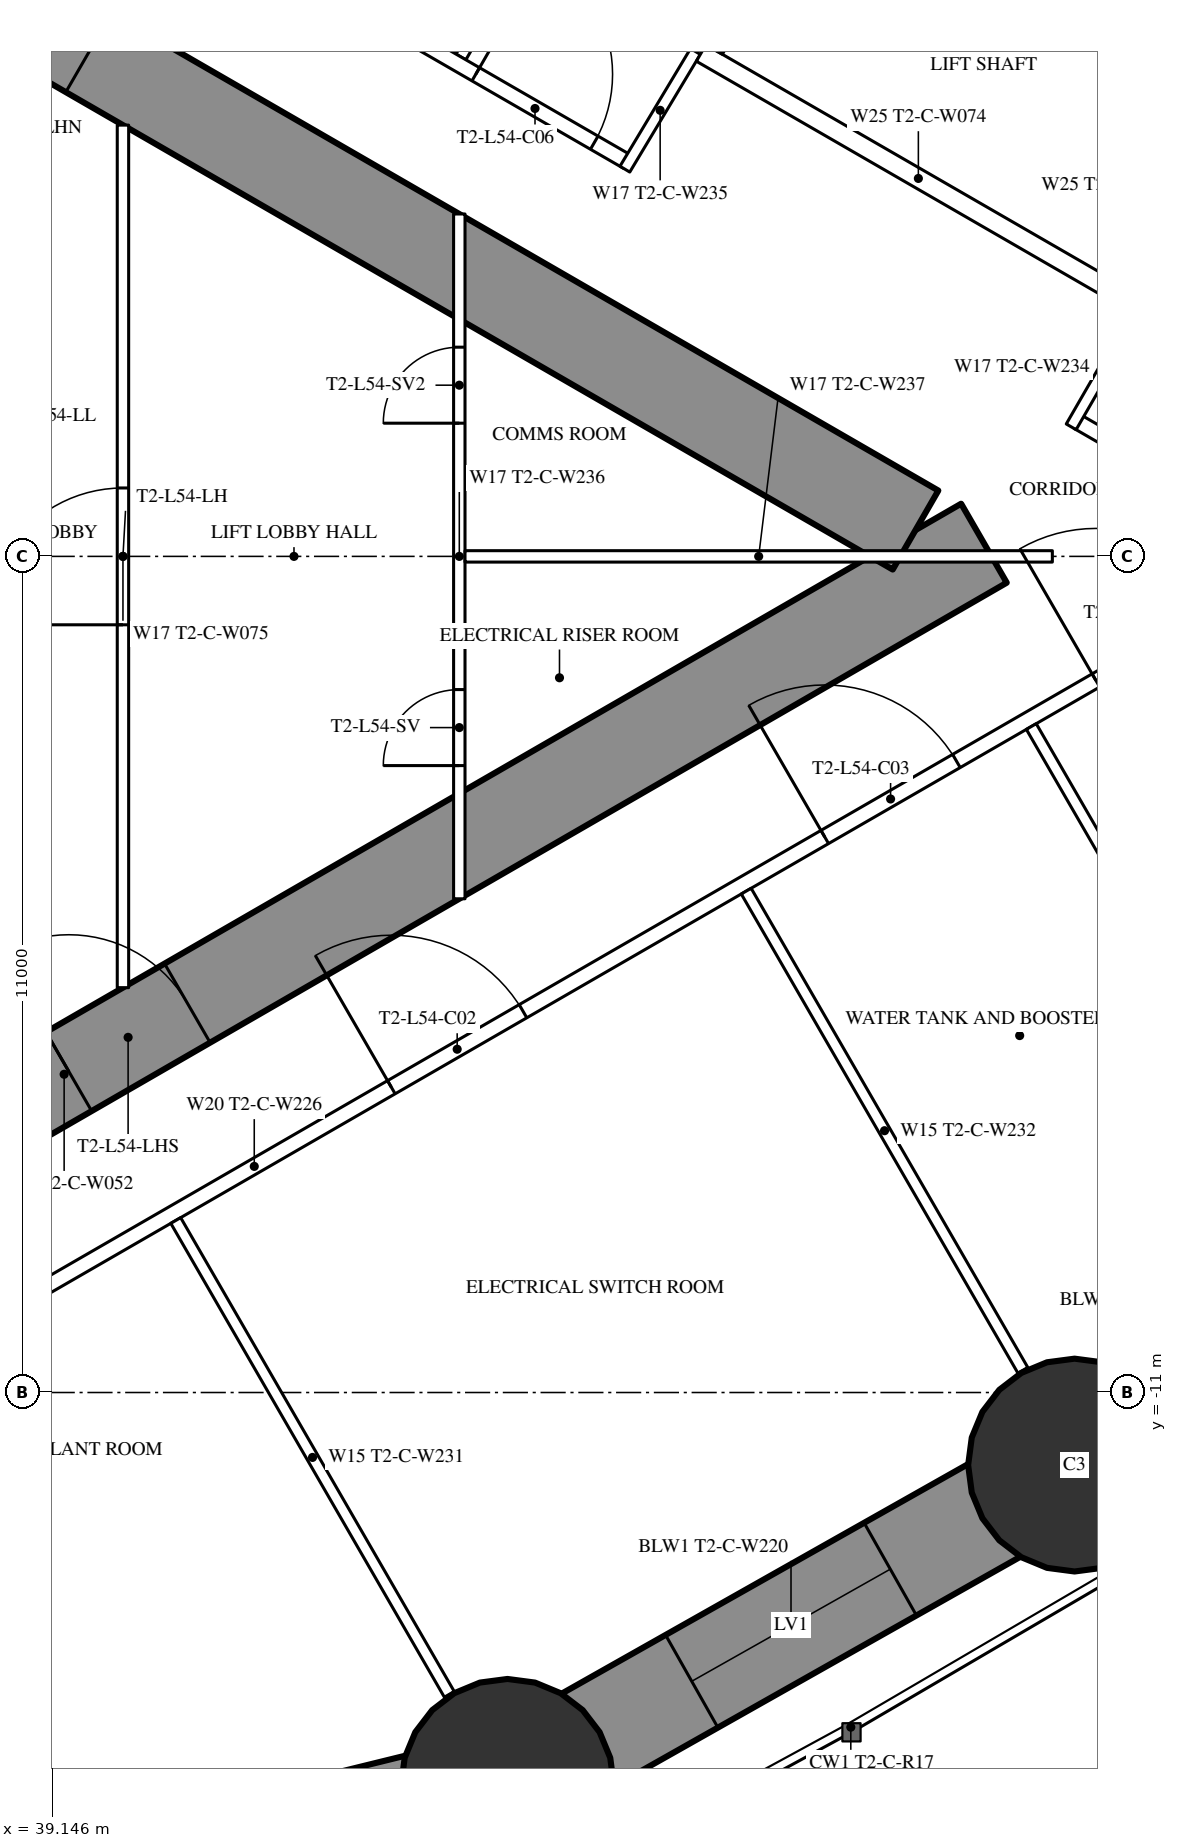
"""IFC4 building model, lengths in metres.
Left out: names, types, materials, properties, quantities, classifications, styles, units other than length and angle.
Written with IfcOpenShell. Run it as: python <this file> out.ifc"""

import sys

from ifc_helpers import new_model, si_unit, direction, frame, frame_2d, origin, origin_2d, place, context, subcontext, project, spatial, rectangle, circle, extrude, element, fill, save


model = new_model("IFC4")
c1 = context("Model", 3, precision=1e-05, world=origin(), true_north=direction((0.0, 1.0)))
c2 = subcontext(c1, "Body", "Model", "MODEL_VIEW")
j1 = project(units=[si_unit("LENGTHUNIT", "METRE"), si_unit("PLANEANGLEUNIT", "RADIAN")], contexts=[c1])
p1 = place(None, origin())
s1 = spatial("IfcSite", under=j1, at=p1, CompositionType="ELEMENT")
p2 = place(p1, origin())
s2 = spatial("IfcBuilding", under=s1, at=p2, CompositionType="ELEMENT")
p3 = place(p2, frame((0.0, 0.0, 201.8)))
s3 = spatial("IfcBuildingStorey", under=s2, at=p3, CompositionType="ELEMENT", Elevation=201.8)
for number, where, z_axis, x_axis in (
    (1, (45.134, -16.168, 0.0), (0.0, 0.0, 1.0), (1.0, 0.0, 0.0)),
    (2, (52.594, -11.955, 0.0), (0.0, 0.0, 1.0), (1.0, 0.0, 0.0)),
):
    element("IfcColumn", number, at=place(p3, frame(where, z_axis=z_axis, x_axis=x_axis)), inside=s3, PredefinedType="COLUMN", context=c2, shape_type="SweptSolid", body=[
        extrude(circle(Radius=1.4, at=origin_2d()), origin(), (0.0, 0.0, 1.0), 3.5),
    ])
p4 = place(p3, frame((27.2, -13.8, 0.0), z_axis=(0.0, 0.0, 1.0), x_axis=(0.866027159892, 0.499996958321, 0.0)))
e3 = element("IfcWall", 3, at=p4, inside=s3, PredefinedType="SHEAR", context=c2, shape_type="SweptSolid", body=[
    extrude(rectangle(XDim=27.947, YDim=1.2, at=frame_2d((13.973, 0.0))), origin(), (0.0, 0.0, 1.0), 3.5),
])
p5 = place(p4, frame((6.5, 0.0, 0.0)))
e4 = element("IfcOpeningElement", 4, at=p5, cuts=e3, PredefinedType="OPENING", context=c2, shape_type="SweptSolid", body=[
    extrude(rectangle(XDim=1.0, YDim=2.2, at=frame_2d((0.5, 1.1))), frame((0.0, 0.61, 0.0), z_axis=(0.0, -1.0, 0.0), x_axis=(1.0, 0.0, 0.0)), (0.0, 0.0, 1.0), 1.22),
])
p6 = place(p4, frame((14.045, 0.0, 0.0)))
e5 = element("IfcOpeningElement", 5, at=p6, cuts=e3, PredefinedType="OPENING", context=c2, shape_type="SweptSolid", body=[
    extrude(rectangle(XDim=1.8, YDim=2.2, at=frame_2d((0.9, 1.1))), frame((0.0, 0.61, 0.0), z_axis=(0.0, -1.0, 0.0), x_axis=(1.0, 0.0, 0.0)), (0.0, 0.0, 1.0), 1.22),
])
p7 = place(p3, frame((27.2, 13.8, 0.0), z_axis=(0.0, 0.0, 1.0), x_axis=(0.866024515034, -0.500001539357, 0.0)))
e6 = element("IfcWall", 6, at=p7, inside=s3, PredefinedType="SHEAR", context=c2, shape_type="SweptSolid", body=[
    extrude(rectangle(XDim=26.907, YDim=1.2, at=frame_2d((13.454, 0.0))), origin(), (0.0, 0.0, 1.0), 3.5),
])
p8 = place(p7, frame((6.5, 0.0, 0.0)))
e7 = element("IfcOpeningElement", 7, at=p8, cuts=e6, PredefinedType="OPENING", context=c2, shape_type="SweptSolid", body=[
    extrude(rectangle(XDim=1.0, YDim=2.2, at=frame_2d((0.5, 1.1))), frame((0.0, 0.61, 0.0), z_axis=(0.0, -1.0, 0.0), x_axis=(1.0, 0.0, 0.0)), (0.0, 0.0, 1.0), 1.22),
])
p9 = place(p7, frame((12.545, 0.0, 0.0)))
e8 = element("IfcOpeningElement", 8, at=p9, cuts=e6, PredefinedType="OPENING", context=c2, shape_type="SweptSolid", body=[
    extrude(rectangle(XDim=1.8, YDim=2.2, at=frame_2d((0.9, 1.1))), frame((0.0, 0.61, 0.0), z_axis=(0.0, -1.0, 0.0), x_axis=(1.0, 0.0, 0.0)), (0.0, 0.0, 1.0), 1.22),
])
p10 = place(p3, frame((31.76, -19.456, 0.0), z_axis=(0.0, 0.0, 1.0), x_axis=(0.971093253227, 0.238700426344, 0.0)))
e9 = element("IfcWall", 9, at=p10, inside=s3, PredefinedType="SHEAR", context=c2, shape_type="SweptSolid", body=[
    extrude(rectangle(XDim=13.772, YDim=1.4, at=frame_2d((6.886, 0.0))), origin(), (0.0, 0.0, 1.0), 3.5),
])
p11 = place(p10, frame((5.386, 0.0, 0.6)))
e10 = element("IfcOpeningElement", 10, at=p11, cuts=e9, PredefinedType="OPENING", context=c2, shape_type="SweptSolid", body=[
    extrude(rectangle(XDim=3.0, YDim=1.2, at=frame_2d((1.5, 0.6))), frame((0.0, 0.71, 0.0), z_axis=(0.0, -1.0, 0.0), x_axis=(1.0, 0.0, 0.0)), (0.0, 0.0, 1.0), 1.42),
])
p12 = place(p3, frame((45.134, -16.168, 0.0), z_axis=(0.0, 0.0, 1.0), x_axis=(0.870721990329, 0.491775574381, 0.0)))
e11 = element("IfcWall", 11, at=p12, inside=s3, PredefinedType="SHEAR", context=c2, shape_type="SweptSolid", body=[
    extrude(rectangle(XDim=8.569, YDim=1.4, at=frame_2d((4.284, 0.0))), origin(), (0.0, 0.0, 1.0), 3.5),
])
p13 = place(p12, frame((2.784, 0.0, 0.6)))
e12 = element("IfcOpeningElement", 12, at=p13, cuts=e11, PredefinedType="OPENING", context=c2, shape_type="SweptSolid", body=[
    extrude(rectangle(XDim=3.0, YDim=1.2, at=frame_2d((1.5, 0.6))), frame((0.0, 0.71, 0.0), z_axis=(0.0, -1.0, 0.0), x_axis=(1.0, 0.0, 0.0)), (0.0, 0.0, 1.0), 1.42),
])
p14 = place(p3, frame((52.594, -11.955, 0.0), z_axis=(0.0, 0.0, 1.0), x_axis=(0.846348902569, 0.532628890617, 0.0)))
e13 = element("IfcWall", 13, at=p14, inside=s3, PredefinedType="SHEAR", context=c2, shape_type="SweptSolid", body=[
    extrude(rectangle(XDim=4.285, YDim=1.4, at=frame_2d((2.143, 0.0))), origin(), (0.0, 0.0, 1.0), 3.5),
])
p15 = place(p3, frame((27.903, -16.05, 0.0), z_axis=(0.0, 0.0, 1.0), x_axis=(0.866022581743, 0.500004887887, 0.0)))
e14 = element("IfcWall", 14, at=p15, inside=s3, PredefinedType="PARTITIONING", context=c2, shape_type="SweptSolid", body=[
    extrude(rectangle(XDim=32.1, YDim=0.2, at=frame_2d((16.05, 0.0))), origin(), (0.0, 0.0, 1.0), 3.25),
])
p16 = place(p15, frame((5.212, 0.0, 0.0)))
e15 = element("IfcOpeningElement", 15, at=p16, cuts=e14, PredefinedType="OPENING", context=c2, shape_type="SweptSolid", body=[
    extrude(rectangle(XDim=2.0, YDim=2.4, at=frame_2d((1.0, 1.2))), frame((0.0, 0.11, 0.0), z_axis=(0.0, -1.0, 0.0), x_axis=(1.0, 0.0, 0.0)), (0.0, 0.0, 1.0), 0.22),
])
p17 = place(p15, frame((18.133, 0.0, 0.0)))
e16 = element("IfcOpeningElement", 16, at=p17, cuts=e14, PredefinedType="OPENING", context=c2, shape_type="SweptSolid", body=[
    extrude(rectangle(XDim=2.0, YDim=2.4, at=frame_2d((1.0, 1.2))), frame((0.0, 0.11, 0.0), z_axis=(0.0, -1.0, 0.0), x_axis=(1.0, 0.0, 0.0)), (0.0, 0.0, 1.0), 0.22),
])
p18 = place(p15, frame((24.717, 0.0, 0.0)))
e17 = element("IfcOpeningElement", 17, at=p18, cuts=e14, PredefinedType="OPENING", context=c2, shape_type="SweptSolid", body=[
    extrude(rectangle(XDim=2.0, YDim=2.4, at=frame_2d((1.0, 1.2))), frame((0.0, 0.11, 0.0), z_axis=(0.0, -1.0, 0.0), x_axis=(1.0, 0.0, 0.0)), (0.0, 0.0, 1.0), 0.22),
])
p19 = place(p15, frame((28.836, 0.0, 0.0)))
e18 = element("IfcOpeningElement", 18, at=p19, cuts=e14, PredefinedType="OPENING", context=c2, shape_type="SweptSolid", body=[
    extrude(rectangle(XDim=2.0, YDim=2.4, at=frame_2d((1.0, 1.2))), frame((0.0, 0.11, 0.0), z_axis=(0.0, -1.0, 0.0), x_axis=(1.0, 0.0, 0.0)), (0.0, 0.0, 1.0), 0.22),
])
p20 = place(p3, frame((40.769, -8.737, 0.0), z_axis=(0.0, 0.0, 1.0), x_axis=(0.500013115284, -0.866017831539, 0.0)))
e19 = element("IfcWall", 19, at=p20, inside=s3, PredefinedType="PARTITIONING", context=c2, shape_type="SweptSolid", body=[
    extrude(rectangle(XDim=7.198, YDim=0.15, at=frame_2d((3.599, 0.0))), origin(), (0.0, 0.0, 1.0), 2.05),
])
p21 = place(p3, frame((48.275, -4.404, 0.0), z_axis=(0.0, 0.0, 1.0), x_axis=(0.500006004368, -0.866021937133, 0.0)))
e20 = element("IfcWall", 20, at=p21, inside=s3, PredefinedType="PARTITIONING", context=c2, shape_type="SweptSolid", body=[
    extrude(rectangle(XDim=7.279, YDim=0.15, at=frame_2d((3.64, 0.0))), origin(), (0.0, 0.0, 1.0), 2.05),
])
p22 = place(p3, frame((52.025, -2.238, 0.0), z_axis=(0.0, 0.0, 1.0), x_axis=(0.499983785035, -0.866034765296, 0.0)))
e21 = element("IfcWall", 21, at=p22, inside=s3, PredefinedType="PARTITIONING", context=c2, shape_type="SweptSolid", body=[
    extrude(rectangle(XDim=7.116, YDim=0.15, at=frame_2d((3.558, 0.0))), origin(), (0.0, 0.0, 1.0), 2.05),
])
p23 = place(p3, frame((44.521, 6.571, 0.0), z_axis=(0.0, 0.0, 1.0), x_axis=(0.500020376429, 0.866013639128, 0.0)))
e22 = element("IfcWall", 22, at=p23, inside=s3, PredefinedType="PARTITIONING", context=c2, shape_type="SweptSolid", body=[
    extrude(rectangle(XDim=7.306, YDim=0.15, at=frame_2d((3.653, 0.0))), origin(), (0.0, 0.0, 1.0), 2.05),
])
p24 = place(p3, frame((27.903, 16.05, 0.0), z_axis=(0.0, 0.0, 1.0), x_axis=(0.866024818307, -0.500001014076, 0.0)))
e23 = element("IfcWall", 23, at=p24, inside=s3, PredefinedType="PARTITIONING", context=c2, shape_type="SweptSolid", body=[
    extrude(rectangle(XDim=21.723, YDim=0.2, at=frame_2d((10.862, 0.0))), origin(), (0.0, 0.0, 1.0), 3.25),
])
p25 = place(p24, frame((15.966, 0.0, 0.0)))
e24 = element("IfcOpeningElement", 24, at=p25, cuts=e23, PredefinedType="OPENING", context=c2, shape_type="SweptSolid", body=[
    extrude(rectangle(XDim=2.0, YDim=2.03, at=frame_2d((1.0, 1.015))), frame((0.0, 0.11, 0.0), z_axis=(0.0, -1.0, 0.0), x_axis=(1.0, 0.0, 0.0)), (0.0, 0.0, 1.0), 0.22),
])
p26 = place(p24, frame((5.662, 0.0, 0.0)))
e25 = element("IfcOpeningElement", 25, at=p26, cuts=e23, PredefinedType="OPENING", context=c2, shape_type="SweptSolid", body=[
    extrude(rectangle(XDim=2.0, YDim=2.4, at=frame_2d((1.0, 1.2))), frame((0.0, 0.11, 0.0), z_axis=(0.0, -1.0, 0.0), x_axis=(1.0, 0.0, 0.0)), (0.0, 0.0, 1.0), 0.22),
])
p27 = place(p24, frame((19.415, 0.0, 0.0)))
e26 = element("IfcOpeningElement", 26, at=p27, cuts=e23, PredefinedType="OPENING", context=c2, shape_type="SweptSolid", body=[
    extrude(rectangle(XDim=1.8, YDim=2.2, at=frame_2d((0.9, 1.1))), frame((0.0, 0.11, 0.0), z_axis=(0.0, -1.0, 0.0), x_axis=(1.0, 0.0, 0.0)), (0.0, 0.0, 1.0), 0.22),
])
p28 = place(p3, frame((52.639, 1.769, 0.0), z_axis=(0.0, 0.0, 1.0), x_axis=(0.866027340901, -0.4999966448, 0.0)))
e27 = element("IfcWall", 27, at=p28, inside=s3, PredefinedType="PARTITIONING", context=c2, shape_type="SweptSolid", body=[
    extrude(rectangle(XDim=3.417, YDim=0.2, at=frame_2d((1.708, 0.0))), origin(), (0.0, 0.0, 1.0), 3.25),
])
p29 = place(p28, frame((0.708, 0.0, 0.0)))
e28 = element("IfcOpeningElement", 28, at=p29, cuts=e27, PredefinedType="OPENING", context=c2, shape_type="SweptSolid", body=[
    extrude(rectangle(XDim=2.0, YDim=2.03, at=frame_2d((1.0, 1.015))), frame((0.0, 0.11, 0.0), z_axis=(0.0, -1.0, 0.0), x_axis=(1.0, 0.0, 0.0)), (0.0, 0.0, 1.0), 0.22),
])
p30 = place(p3, frame((52.55, 1.704, 0.0), z_axis=(0.0, 0.0, 1.0), x_axis=(0.499980071345, 0.866036909293, 0.0)))
e29 = element("IfcWall", 29, at=p30, inside=s3, PredefinedType="PARTITIONING", context=c2, shape_type="SweptSolid", body=[
    extrude(rectangle(XDim=1.805, YDim=0.15, at=frame_2d((0.902, 0.0))), origin(), (0.0, 0.0, 1.0), 3.25),
])
p31 = place(p3, frame((47.606, 6.642, 0.0), z_axis=(0.0, 0.0, 1.0), x_axis=(-0.514296815006, -0.857612258585, 0.0)))
e30 = element("IfcWall", 30, at=p31, inside=s3, PredefinedType="PARTITIONING", context=c2, shape_type="SweptSolid", body=[
    extrude(rectangle(XDim=1.805, YDim=0.15, at=frame_2d((0.902, 0.0))), origin(), (0.0, 0.0, 1.0), 3.25),
])
p32 = place(p3, frame((40.075, -5.674, 0.0), z_axis=(0.0, 0.0, 1.0), x_axis=(0.0, 1.0, 0.0)))
e31 = element("IfcWall", 31, at=p32, inside=s3, PredefinedType="PARTITIONING", context=c2, shape_type="SweptSolid", body=[
    extrude(rectangle(XDim=11.348, YDim=0.15, at=frame_2d((5.674, 0.0))), origin(), (0.0, 0.0, 1.0), 3.25),
])
p33 = place(p32, frame((4.774, 0.0, 0.0)))
e32 = element("IfcOpeningElement", 32, at=p33, cuts=e31, PredefinedType="OPENING", context=c2, shape_type="SweptSolid", body=[
    extrude(rectangle(XDim=1.8, YDim=2.2, at=frame_2d((0.9, 1.1))), frame((0.0, 0.085, 0.0), z_axis=(0.0, -1.0, 0.0), x_axis=(1.0, 0.0, 0.0)), (0.0, 0.0, 1.0), 0.17),
])
p34 = place(p3, frame((44.5, -4.505, 0.0), z_axis=(0.0, 0.0, 1.0), x_axis=(0.0, 1.0, 0.0)))
e33 = element("IfcWall", 33, at=p34, inside=s3, PredefinedType="PARTITIONING", context=c2, shape_type="SweptSolid", body=[
    extrude(rectangle(XDim=9.009, YDim=0.15, at=frame_2d((4.505, 0.0))), origin(), (0.0, 0.0, 1.0), 3.25),
])
p35 = place(p34, frame((1.752, 0.0, 0.0)))
e34 = element("IfcOpeningElement", 34, at=p35, cuts=e33, PredefinedType="OPENING", context=c2, shape_type="SweptSolid", body=[
    extrude(rectangle(XDim=1.0, YDim=2.2, at=frame_2d((0.5, 1.1))), frame((0.0, 0.085, 0.0), z_axis=(0.0, -1.0, 0.0), x_axis=(1.0, 0.0, 0.0)), (0.0, 0.0, 1.0), 0.17),
])
p36 = place(p34, frame((6.257, 0.0, 0.0)))
e35 = element("IfcOpeningElement", 35, at=p36, cuts=e33, PredefinedType="OPENING", context=c2, shape_type="SweptSolid", body=[
    extrude(rectangle(XDim=1.0, YDim=2.2, at=frame_2d((0.5, 1.1))), frame((0.0, 0.085, 0.0), z_axis=(0.0, -1.0, 0.0), x_axis=(1.0, 0.0, 0.0)), (0.0, 0.0, 1.0), 0.17),
])
p37 = place(p3, frame((44.575, 0.0, 0.0), z_axis=(0.0, 0.0, 1.0), x_axis=(1.0, 0.0, 0.0)))
e36 = element("IfcWall", 36, at=p37, inside=s3, PredefinedType="PARTITIONING", context=c2, shape_type="SweptSolid", body=[
    extrude(rectangle(XDim=7.727, YDim=0.15, at=frame_2d((3.864, 0.0))), origin(), (0.0, 0.0, 1.0), 2.05),
])
for number, where, z_axis, x_axis in (
    (37, (47.681, 6.622, 0.0), (0.0, 0.0, 1.0), (0.866, -0.5, 0.0)),
    (38, (49.406, 9.611, 0.0), (0.0, 0.0, 1.0), (0.866, -0.5, 0.0)),
):
    element("IfcWall", number, at=place(p3, frame(where, z_axis=z_axis, x_axis=x_axis)), inside=s3, PredefinedType="PARTITIONING", context=c2, shape_type="SweptSolid", body=[
        extrude(rectangle(XDim=6.6, YDim=0.25, at=frame_2d((3.3, 0.0))), origin(), (0.0, 0.0, 1.0), 3.25),
    ])
p38 = place(p3, frame((47.852, 6.668, 0.0), z_axis=(0.0, 0.0, 1.0), x_axis=(0.499929347863, 0.866066190972, 0.0)))
e39 = element("IfcWall", 39, at=p38, inside=s3, PredefinedType="PARTITIONING", context=c2, shape_type="SweptSolid", body=[
    extrude(rectangle(XDim=3.201, YDim=0.25, at=frame_2d((1.6, 0.0))), origin(), (0.0, 0.0, 1.0), 3.25),
])
p39 = place(p13, origin())
e40 = element("IfcWindow", 40, at=p39, inside=s3, PartitioningType="SINGLE_PANEL", PredefinedType="WINDOW", context=c2, shape_type="SweptSolid", body=[
    extrude(rectangle(XDim=3.0, YDim=1.2, at=frame_2d((1.5, 0.6))), frame((0.0, 0.03, 0.0), z_axis=(0.0, -1.0, 0.0), x_axis=(1.0, 0.0, 0.0)), (0.0, 0.0, 1.0), 0.06),
])
fill(e12, e40)
p40 = place(p17, origin())
e41 = element("IfcDoor", 41, at=p40, inside=s3, OperationType="DOUBLE_DOOR_SINGLE_SWING", PredefinedType="DOOR", context=c2, shape_type="SweptSolid", body=[
    extrude(rectangle(XDim=2.0, YDim=2.4, at=frame_2d((1.0, 1.2))), frame((0.0, 0.025, 0.0), z_axis=(0.0, -1.0, 0.0), x_axis=(1.0, 0.0, 0.0)), (0.0, 0.0, 1.0), 0.05),
])
fill(e16, e41)
p41 = place(p18, origin())
e42 = element("IfcDoor", 42, at=p41, inside=s3, OperationType="DOUBLE_DOOR_SINGLE_SWING", PredefinedType="DOOR", context=c2, shape_type="SweptSolid", body=[
    extrude(rectangle(XDim=2.0, YDim=2.4, at=frame_2d((1.0, 1.2))), frame((0.0, 0.025, 0.0), z_axis=(0.0, -1.0, 0.0), x_axis=(1.0, 0.0, 0.0)), (0.0, 0.0, 1.0), 0.05),
])
fill(e17, e42)
p42 = place(p19, origin())
e43 = element("IfcDoor", 43, at=p42, inside=s3, OperationType="DOUBLE_DOOR_SINGLE_SWING", PredefinedType="DOOR", context=c2, shape_type="SweptSolid", body=[
    extrude(rectangle(XDim=2.0, YDim=2.4, at=frame_2d((1.0, 1.2))), frame((0.0, 0.025, 0.0), z_axis=(0.0, -1.0, 0.0), x_axis=(1.0, 0.0, 0.0)), (0.0, 0.0, 1.0), 0.05),
])
fill(e18, e43)
p43 = place(p27, origin())
e44 = element("IfcDoor", 44, at=p43, inside=s3, OperationType="DOUBLE_DOOR_SINGLE_SWING", PredefinedType="DOOR", context=c2, shape_type="SweptSolid", body=[
    extrude(rectangle(XDim=1.8, YDim=2.2, at=frame_2d((0.9, 1.1))), frame((0.0, 0.025, 0.0), z_axis=(0.0, -1.0, 0.0), x_axis=(1.0, 0.0, 0.0)), (0.0, 0.0, 1.0), 0.05),
])
fill(e26, e44)
p44 = place(p33, origin())
e45 = element("IfcDoor", 45, at=p44, inside=s3, OperationType="DOUBLE_DOOR_SINGLE_SWING", PredefinedType="DOOR", context=c2, shape_type="SweptSolid", body=[
    extrude(rectangle(XDim=1.8, YDim=2.2, at=frame_2d((0.9, 1.1))), frame((0.0, 0.025, 0.0), z_axis=(0.0, -1.0, 0.0), x_axis=(1.0, 0.0, 0.0)), (0.0, 0.0, 1.0), 0.05),
])
fill(e32, e45)
p45 = place(p35, origin())
e46 = element("IfcDoor", 46, at=p45, inside=s3, OperationType="SINGLE_SWING_LEFT", PredefinedType="DOOR", context=c2, shape_type="SweptSolid", body=[
    extrude(rectangle(XDim=1.0, YDim=2.2, at=frame_2d((0.5, 1.1))), frame((0.0, 0.025, 0.0), z_axis=(0.0, -1.0, 0.0), x_axis=(1.0, 0.0, 0.0)), (0.0, 0.0, 1.0), 0.05),
])
fill(e34, e46)
p46 = place(p36, origin())
e47 = element("IfcDoor", 47, at=p46, inside=s3, OperationType="SINGLE_SWING_LEFT", PredefinedType="DOOR", context=c2, shape_type="SweptSolid", body=[
    extrude(rectangle(XDim=1.0, YDim=2.2, at=frame_2d((0.5, 1.1))), frame((0.0, 0.025, 0.0), z_axis=(0.0, -1.0, 0.0), x_axis=(1.0, 0.0, 0.0)), (0.0, 0.0, 1.0), 0.05),
])
fill(e35, e47)
p47 = place(p6, origin())
e48 = element("IfcDoor", 48, at=p47, inside=s3, OperationType="DOUBLE_DOOR_SINGLE_SWING", PredefinedType="DOOR", context=c2, shape_type="SweptSolid", body=[
    extrude(rectangle(XDim=1.8, YDim=2.2, at=frame_2d((0.9, 1.1))), frame((0.0, 0.025, 0.0), z_axis=(0.0, -1.0, 0.0), x_axis=(1.0, 0.0, 0.0)), (0.0, 0.0, 1.0), 0.05),
])
fill(e5, e48)
p48 = place(p9, origin())
e49 = element("IfcDoor", 49, at=p48, inside=s3, OperationType="DOUBLE_DOOR_SINGLE_SWING", PredefinedType="DOOR", context=c2, shape_type="SweptSolid", body=[
    extrude(rectangle(XDim=1.8, YDim=2.2, at=frame_2d((0.9, 1.1))), frame((0.0, 0.025, 0.0), z_axis=(0.0, -1.0, 0.0), x_axis=(1.0, 0.0, 0.0)), (0.0, 0.0, 1.0), 0.05),
])
fill(e8, e49)
save(model, sys.argv[1])
